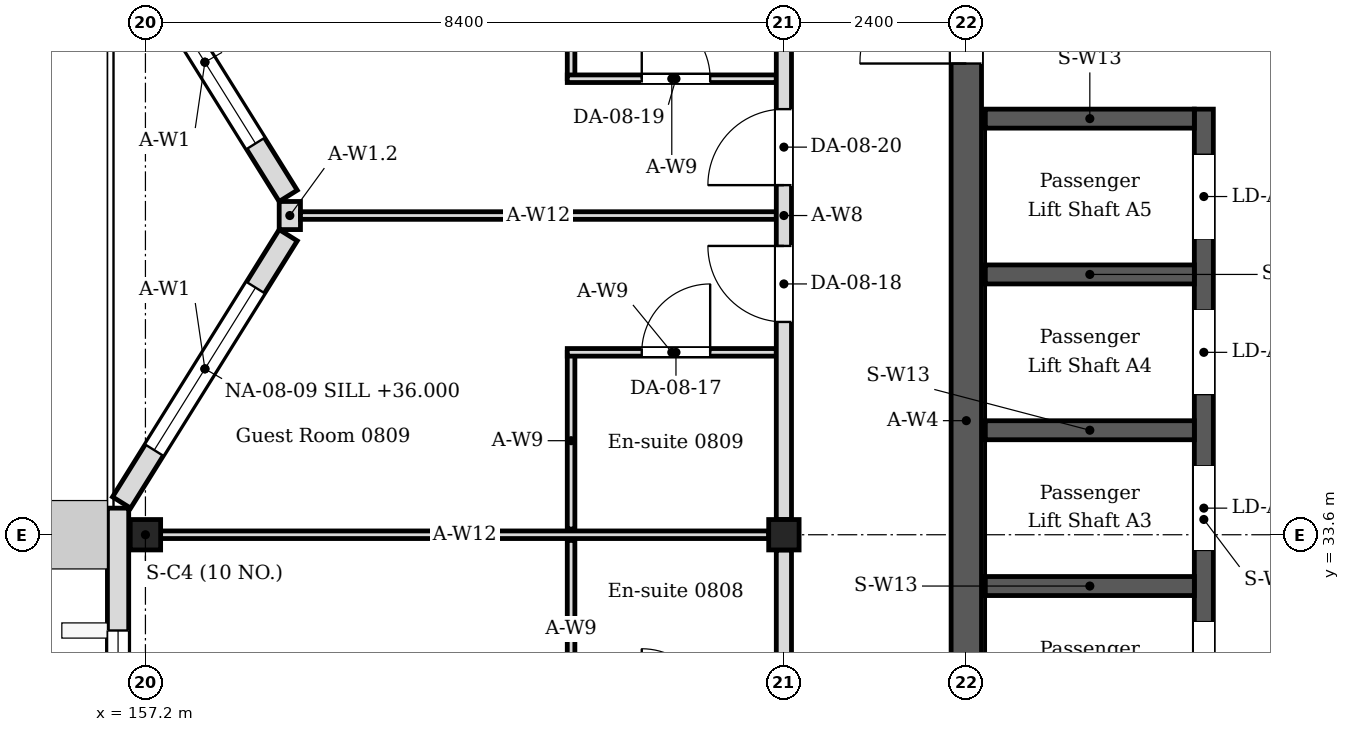
"""IFC4 building model, lengths in metres.
Left out: names, types, materials, properties, quantities, classifications, styles, units other than length and angle.
Written with IfcOpenShell. Run it as: python <this file> out.ifc"""

import sys

from ifc_helpers import new_model, si_unit, direction, frame, frame_2d, origin, origin_2d, place, context, subcontext, project, spatial, rectangle, i_section, extrude, element, fill, save


model = new_model("IFC4")
c1 = context("Model", 3, precision=1e-05, world=origin(), true_north=direction((0.0, 1.0)))
c2 = subcontext(c1, "Body", "Model", "MODEL_VIEW")
j1 = project(units=[si_unit("LENGTHUNIT", "METRE"), si_unit("PLANEANGLEUNIT", "RADIAN")], contexts=[c1])
p1 = place(None, origin())
s1 = spatial("IfcSite", under=j1, at=p1, CompositionType="ELEMENT")
p2 = place(p1, origin())
s2 = spatial("IfcBuilding", under=s1, at=p2, CompositionType="ELEMENT")
p3 = place(p2, frame((0.0, 0.0, 35.4)))
s3 = spatial("IfcBuildingStorey", under=s2, at=p3, CompositionType="ELEMENT", Elevation=35.4)
for number, where, z_axis, x_axis in (
    (1, (157.2, 33.6, 0.0), (0.0, 0.0, 1.0), (1.0, 0.0, 0.0)),
    (2, (165.6, 33.6, 0.0), (0.0, 0.0, 1.0), (1.0, 0.0, 0.0)),
):
    element("IfcColumn", number, at=place(p3, frame(where, z_axis=z_axis, x_axis=x_axis)), inside=s3, PredefinedType="COLUMN", context=c2, shape_type="SweptSolid", body=[
        extrude(i_section(OverallWidth=0.4, OverallDepth=0.4, WebThickness=0.013, FlangeThickness=0.021, FilletRadius=0.022, at=origin_2d()), origin(), (0.0, 0.0, 1.0), 4.2),
    ])
p4 = place(p3, frame((168.0, 25.4, 0.0), z_axis=(0.0, 0.0, 1.0), x_axis=(0.0, 1.0, 0.0)))
e3 = element("IfcWall", 3, at=p4, inside=s3, PredefinedType="SOLIDWALL", context=c2, shape_type="SweptSolid", body=[
    extrude(rectangle(XDim=16.4, YDim=0.4, at=frame_2d((8.2, 0.0))), origin(), (0.0, 0.0, 1.0), 4.05),
])
p5 = place(p4, frame((1.0, 0.0, 0.0)))
e4 = element("IfcOpeningElement", 4, at=p5, cuts=e3, PredefinedType="OPENING", context=c2, shape_type="SweptSolid", body=[
    extrude(rectangle(XDim=1.0, YDim=2.1, at=frame_2d((0.5, 1.05))), frame((0.0, 0.21, 0.0), z_axis=(0.0, -1.0, 0.0), x_axis=(1.0, 0.0, 0.0)), (0.0, 0.0, 1.0), 0.42),
])
p6 = place(p4, frame((14.4, 0.0, 0.0)))
e5 = element("IfcOpeningElement", 5, at=p6, cuts=e3, PredefinedType="OPENING", context=c2, shape_type="SweptSolid", body=[
    extrude(rectangle(XDim=1.4, YDim=2.1, at=frame_2d((0.7, 1.05))), frame((0.0, 0.21, 0.0), z_axis=(0.0, -1.0, 0.0), x_axis=(1.0, 0.0, 0.0)), (0.0, 0.0, 1.0), 0.42),
])
p7 = place(p3, frame((156.84, 24.85, 0.0), z_axis=(0.0, 0.0, 1.0), x_axis=(0.0, 1.0, 0.0)))
e6 = element("IfcWall", 6, at=p7, inside=s3, PredefinedType="SOLIDWALL", context=c2, shape_type="SweptSolid", body=[
    extrude(rectangle(XDim=9.1, YDim=0.28, at=frame_2d((4.55, 0.0))), origin(), (0.0, 0.0, 1.0), 4.05),
])
p8 = place(p7, frame((0.77, 0.0, 0.6)))
e7 = element("IfcOpeningElement", 7, at=p8, cuts=e6, PredefinedType="OPENING", context=c2, shape_type="SweptSolid", body=[
    extrude(rectangle(XDim=2.52, YDim=2.4, at=frame_2d((1.26, 1.2))), frame((0.0, 0.15, 0.0), z_axis=(0.0, -1.0, 0.0), x_axis=(1.0, 0.0, 0.0)), (0.0, 0.0, 1.0), 0.3),
])
p9 = place(p7, frame((4.97, 0.0, 0.6)))
e8 = element("IfcOpeningElement", 8, at=p9, cuts=e6, PredefinedType="OPENING", context=c2, shape_type="SweptSolid", body=[
    extrude(rectangle(XDim=2.52, YDim=2.4, at=frame_2d((1.26, 1.2))), frame((0.0, 0.15, 0.0), z_axis=(0.0, -1.0, 0.0), x_axis=(1.0, 0.0, 0.0)), (0.0, 0.0, 1.0), 0.3),
])
p10 = place(p3, frame((156.886, 34.024, 0.0), z_axis=(0.0, 0.0, 1.0), x_axis=(0.529018946142, 0.848610013271, 0.0)))
e9 = element("IfcWall", 9, at=p10, inside=s3, PredefinedType="SOLIDWALL", context=c2, shape_type="SweptSolid", body=[
    extrude(rectangle(XDim=4.144, YDim=0.28, at=frame_2d((2.072, 0.0))), origin(), (0.0, 0.0, 1.0), 4.05),
])
p11 = place(p10, frame((0.812, 0.0, 0.6)))
e10 = element("IfcOpeningElement", 10, at=p11, cuts=e9, PredefinedType="OPENING", context=c2, shape_type="SweptSolid", body=[
    extrude(rectangle(XDim=2.52, YDim=2.4, at=frame_2d((1.26, 1.2))), frame((0.0, 0.15, 0.0), z_axis=(0.0, -1.0, 0.0), x_axis=(1.0, 0.0, 0.0)), (0.0, 0.0, 1.0), 0.3),
])
p12 = place(p3, frame((159.079, 38.059, 0.0), z_axis=(0.0, 0.0, 1.0), x_axis=(-0.529018946142, 0.848610013271, 0.0)))
e11 = element("IfcWall", 11, at=p12, inside=s3, PredefinedType="SOLIDWALL", context=c2, shape_type="SweptSolid", body=[
    extrude(rectangle(XDim=4.144, YDim=0.28, at=frame_2d((2.072, 0.0))), origin(), (0.0, 0.0, 1.0), 4.05),
])
p13 = place(p12, frame((0.812, 0.0, 0.6)))
e12 = element("IfcOpeningElement", 12, at=p13, cuts=e11, PredefinedType="OPENING", context=c2, shape_type="SweptSolid", body=[
    extrude(rectangle(XDim=2.52, YDim=2.4, at=frame_2d((1.26, 1.2))), frame((0.0, 0.15, 0.0), z_axis=(0.0, -1.0, 0.0), x_axis=(1.0, 0.0, 0.0)), (0.0, 0.0, 1.0), 0.3),
])
p14 = place(p3, frame((159.1, 37.615, 0.0), z_axis=(0.0, 0.0, 1.0), x_axis=(0.0, 1.0, 0.0)))
e13 = element("IfcWall", 13, at=p14, inside=s3, PredefinedType="SOLIDWALL", context=c2, shape_type="SweptSolid", body=[
    extrude(rectangle(XDim=0.37, YDim=0.28, at=frame_2d((0.185, 0.0))), origin(), (0.0, 0.0, 1.0), 3.604),
])
for number, where, z_axis, x_axis in (
    (14, (162.8, 31.2, 0.0), (0.0, 0.0, 1.0), (0.0, 1.0, 0.0)),
    (15, (162.8, 33.675, 0.0), (0.0, 0.0, 1.0), (0.0, 1.0, 0.0)),
):
    element("IfcWall", number, at=place(p3, frame(where, z_axis=z_axis, x_axis=x_axis)), inside=s3, PredefinedType="PARTITIONING", context=c2, shape_type="SweptSolid", body=[
        extrude(rectangle(XDim=2.325, YDim=0.1, at=frame_2d((1.163, 0.0))), origin(), (0.0, 0.0, 1.0), 4.05),
    ])
p15 = place(p3, frame((162.75, 36.0, 0.0), z_axis=(0.0, 0.0, 1.0), x_axis=(1.0, 0.0, 0.0)))
e16 = element("IfcWall", 16, at=p15, inside=s3, PredefinedType="PARTITIONING", context=c2, shape_type="SweptSolid", body=[
    extrude(rectangle(XDim=2.75, YDim=0.1, at=frame_2d((1.375, 0.0))), origin(), (0.0, 0.0, 1.0), 4.05),
])
p16 = place(p15, frame((0.98, 0.0, 0.0)))
e17 = element("IfcOpeningElement", 17, at=p16, cuts=e16, PredefinedType="OPENING", context=c2, shape_type="SweptSolid", body=[
    extrude(rectangle(XDim=0.9, YDim=2.1, at=frame_2d((0.45, 1.05))), frame((0.0, 0.06, 0.0), z_axis=(0.0, -1.0, 0.0), x_axis=(1.0, 0.0, 0.0)), (0.0, 0.0, 1.0), 0.12),
])
p17 = place(p3, frame((162.8, 39.6, 0.0), z_axis=(0.0, 0.0, 1.0), x_axis=(0.0, 1.0, 0.0)))
e18 = element("IfcWall", 18, at=p17, inside=s3, PredefinedType="PARTITIONING", context=c2, shape_type="SweptSolid", body=[
    extrude(rectangle(XDim=2.325, YDim=0.1, at=frame_2d((1.163, 0.0))), origin(), (0.0, 0.0, 1.0), 4.05),
])
p18 = place(p3, frame((162.75, 39.6, 0.0), z_axis=(0.0, 0.0, 1.0), x_axis=(1.0, 0.0, 0.0)))
e19 = element("IfcWall", 19, at=p18, inside=s3, PredefinedType="PARTITIONING", context=c2, shape_type="SweptSolid", body=[
    extrude(rectangle(XDim=2.75, YDim=0.1, at=frame_2d((1.375, 0.0))), origin(), (0.0, 0.0, 1.0), 4.05),
])
p19 = place(p18, frame((0.98, 0.0, 0.0)))
e20 = element("IfcOpeningElement", 20, at=p19, cuts=e19, PredefinedType="OPENING", context=c2, shape_type="SweptSolid", body=[
    extrude(rectangle(XDim=0.9, YDim=2.1, at=frame_2d((0.45, 1.05))), frame((0.0, 0.06, 0.0), z_axis=(0.0, -1.0, 0.0), x_axis=(1.0, 0.0, 0.0)), (0.0, 0.0, 1.0), 0.12),
])
p20 = place(p3, frame((157.4, 33.6, 0.0), z_axis=(0.0, 0.0, 1.0), x_axis=(1.0, 0.0, 0.0)))
e21 = element("IfcWall", 21, at=p20, inside=s3, PredefinedType="PARTITIONING", context=c2, shape_type="SweptSolid", body=[
    extrude(rectangle(XDim=8.0, YDim=0.1, at=frame_2d((4.0, 0.0))), origin(), (0.0, 0.0, 1.0), 3.604),
])
p21 = place(p3, frame((159.24, 37.8, 0.0), z_axis=(0.0, 0.0, 1.0), x_axis=(1.0, 0.0, 0.0)))
e22 = element("IfcWall", 22, at=p21, inside=s3, PredefinedType="PARTITIONING", context=c2, shape_type="SweptSolid", body=[
    extrude(rectangle(XDim=6.26, YDim=0.1, at=frame_2d((3.13, 0.0))), origin(), (0.0, 0.0, 1.0), 3.604),
])
p22 = place(p3, frame((165.6, 25.4, 0.0), z_axis=(0.0, 0.0, 1.0), x_axis=(0.0, 1.0, 0.0)))
e23 = element("IfcWall", 23, at=p22, inside=s3, PredefinedType="PARTITIONING", context=c2, shape_type="SweptSolid", body=[
    extrude(rectangle(XDim=8.0, YDim=0.2, at=frame_2d((4.0, 0.0))), origin(), (0.0, 0.0, 1.0), 3.45),
])
p23 = place(p22, frame((1.98, 0.0, 0.0)))
e24 = element("IfcOpeningElement", 24, at=p23, cuts=e23, PredefinedType="OPENING", context=c2, shape_type="SweptSolid", body=[
    extrude(rectangle(XDim=1.0, YDim=2.4, at=frame_2d((0.5, 1.2))), frame((0.0, 0.11, 0.0), z_axis=(0.0, -1.0, 0.0), x_axis=(1.0, 0.0, 0.0)), (0.0, 0.0, 1.0), 0.22),
])
p24 = place(p22, frame((3.98, 0.0, 0.0)))
e25 = element("IfcOpeningElement", 25, at=p24, cuts=e23, PredefinedType="OPENING", context=c2, shape_type="SweptSolid", body=[
    extrude(rectangle(XDim=1.0, YDim=2.4, at=frame_2d((0.5, 1.2))), frame((0.0, 0.11, 0.0), z_axis=(0.0, -1.0, 0.0), x_axis=(1.0, 0.0, 0.0)), (0.0, 0.0, 1.0), 0.22),
])
p25 = place(p3, frame((165.6, 33.8, 0.0), z_axis=(0.0, 0.0, 1.0), x_axis=(0.0, 1.0, 0.0)))
e26 = element("IfcWall", 26, at=p25, inside=s3, PredefinedType="PARTITIONING", context=c2, shape_type="SweptSolid", body=[
    extrude(rectangle(XDim=8.0, YDim=0.2, at=frame_2d((4.0, 0.0))), origin(), (0.0, 0.0, 1.0), 3.45),
])
p26 = place(p25, frame((2.6, 0.0, 0.0)))
e27 = element("IfcOpeningElement", 27, at=p26, cuts=e26, PredefinedType="OPENING", context=c2, shape_type="SweptSolid", body=[
    extrude(rectangle(XDim=1.0, YDim=2.4, at=frame_2d((0.5, 1.2))), frame((0.0, 0.11, 0.0), z_axis=(0.0, -1.0, 0.0), x_axis=(1.0, 0.0, 0.0)), (0.0, 0.0, 1.0), 0.22),
])
p27 = place(p25, frame((4.4, 0.0, 0.0)))
e28 = element("IfcOpeningElement", 28, at=p27, cuts=e26, PredefinedType="OPENING", context=c2, shape_type="SweptSolid", body=[
    extrude(rectangle(XDim=1.0, YDim=2.4, at=frame_2d((0.5, 1.2))), frame((0.0, 0.11, 0.0), z_axis=(0.0, -1.0, 0.0), x_axis=(1.0, 0.0, 0.0)), (0.0, 0.0, 1.0), 0.22),
])
p28 = place(p3, frame((171.125, 28.3, 0.0), z_axis=(0.0, 0.0, 1.0), x_axis=(0.0, 1.0, 0.0)))
e29 = element("IfcWall", 29, at=p28, inside=s3, PredefinedType="SOLIDWALL", context=c2, shape_type="SweptSolid", body=[
    extrude(rectangle(XDim=10.9, YDim=0.25, at=frame_2d((5.45, 0.0))), origin(), (0.0, 0.0, 1.0), 4.05),
])
p29 = place(p28, frame((0.8, 0.0, 0.0)))
e30 = element("IfcOpeningElement", 30, at=p29, cuts=e29, PredefinedType="OPENING", context=c2, shape_type="SweptSolid", body=[
    extrude(rectangle(XDim=1.1, YDim=2.1, at=frame_2d((0.55, 1.05))), frame((0.0, 0.135, 0.0), z_axis=(0.0, -1.0, 0.0), x_axis=(1.0, 0.0, 0.0)), (0.0, 0.0, 1.0), 0.27),
])
p30 = place(p28, frame((3.05, 0.0, 0.0)))
e31 = element("IfcOpeningElement", 31, at=p30, cuts=e29, PredefinedType="OPENING", context=c2, shape_type="SweptSolid", body=[
    extrude(rectangle(XDim=1.1, YDim=2.1, at=frame_2d((0.55, 1.05))), frame((0.0, 0.135, 0.0), z_axis=(0.0, -1.0, 0.0), x_axis=(1.0, 0.0, 0.0)), (0.0, 0.0, 1.0), 0.27),
])
p31 = place(p28, frame((5.1, 0.0, 0.0)))
e32 = element("IfcOpeningElement", 32, at=p31, cuts=e29, PredefinedType="OPENING", context=c2, shape_type="SweptSolid", body=[
    extrude(rectangle(XDim=1.1, YDim=2.1, at=frame_2d((0.55, 1.05))), frame((0.0, 0.135, 0.0), z_axis=(0.0, -1.0, 0.0), x_axis=(1.0, 0.0, 0.0)), (0.0, 0.0, 1.0), 0.27),
])
p32 = place(p28, frame((7.15, 0.0, 0.0)))
e33 = element("IfcOpeningElement", 33, at=p32, cuts=e29, PredefinedType="OPENING", context=c2, shape_type="SweptSolid", body=[
    extrude(rectangle(XDim=1.1, YDim=2.1, at=frame_2d((0.55, 1.05))), frame((0.0, 0.135, 0.0), z_axis=(0.0, -1.0, 0.0), x_axis=(1.0, 0.0, 0.0)), (0.0, 0.0, 1.0), 0.27),
])
p33 = place(p28, frame((9.2, 0.0, 0.0)))
e34 = element("IfcOpeningElement", 34, at=p33, cuts=e29, PredefinedType="OPENING", context=c2, shape_type="SweptSolid", body=[
    extrude(rectangle(XDim=1.1, YDim=2.1, at=frame_2d((0.55, 1.05))), frame((0.0, 0.135, 0.0), z_axis=(0.0, -1.0, 0.0), x_axis=(1.0, 0.0, 0.0)), (0.0, 0.0, 1.0), 0.27),
])
for number, where, z_axis, x_axis in (
    (35, (168.25, 32.925, 0.0), (0.0, 0.0, 1.0), (1.0, 0.0, 0.0)),
    (36, (168.25, 34.975, 0.0), (0.0, 0.0, 1.0), (1.0, 0.0, 0.0)),
    (37, (168.25, 37.025, 0.0), (0.0, 0.0, 1.0), (1.0, 0.0, 0.0)),
    (38, (168.25, 39.075, 0.0), (0.0, 0.0, 1.0), (1.0, 0.0, 0.0)),
):
    element("IfcWall", number, at=place(p3, frame(where, z_axis=z_axis, x_axis=x_axis)), inside=s3, PredefinedType="SOLIDWALL", context=c2, shape_type="SweptSolid", body=[
        extrude(rectangle(XDim=2.75, YDim=0.25, at=frame_2d((1.375, 0.0))), origin(), (0.0, 0.0, 1.0), 4.05),
    ])
p34 = place(p9, origin())
e39 = element("IfcWindow", 39, at=p34, inside=s3, PartitioningType="SINGLE_PANEL", PredefinedType="WINDOW", context=c2, shape_type="SweptSolid", body=[
    extrude(rectangle(XDim=2.52, YDim=2.4, at=frame_2d((1.26, 1.2))), frame((0.0, 0.03, 0.0), z_axis=(0.0, -1.0, 0.0), x_axis=(1.0, 0.0, 0.0)), (0.0, 0.0, 1.0), 0.06),
])
fill(e8, e39)
p35 = place(p11, origin())
e40 = element("IfcWindow", 40, at=p35, inside=s3, PartitioningType="SINGLE_PANEL", PredefinedType="WINDOW", context=c2, shape_type="SweptSolid", body=[
    extrude(rectangle(XDim=2.52, YDim=2.4, at=frame_2d((1.26, 1.2))), frame((0.0, 0.03, 0.0), z_axis=(0.0, -1.0, 0.0), x_axis=(1.0, 0.0, 0.0)), (0.0, 0.0, 1.0), 0.06),
])
fill(e10, e40)
p36 = place(p13, origin())
e41 = element("IfcWindow", 41, at=p36, inside=s3, PartitioningType="SINGLE_PANEL", PredefinedType="WINDOW", context=c2, shape_type="SweptSolid", body=[
    extrude(rectangle(XDim=2.52, YDim=2.4, at=frame_2d((1.26, 1.2))), frame((0.0, 0.03, 0.0), z_axis=(0.0, -1.0, 0.0), x_axis=(1.0, 0.0, 0.0)), (0.0, 0.0, 1.0), 0.06),
])
fill(e12, e41)
p37 = place(p16, origin())
e42 = element("IfcDoor", 42, at=p37, inside=s3, OperationType="SINGLE_SWING_RIGHT", PredefinedType="DOOR", context=c2, shape_type="SweptSolid", body=[
    extrude(rectangle(XDim=0.9, YDim=2.1, at=frame_2d((0.45, 1.05))), frame((0.0, 0.025, 0.0), z_axis=(0.0, -1.0, 0.0), x_axis=(1.0, 0.0, 0.0)), (0.0, 0.0, 1.0), 0.05),
])
fill(e17, e42)
p38 = place(p26, origin())
e43 = element("IfcDoor", 43, at=p38, inside=s3, OperationType="SINGLE_SWING_RIGHT", PredefinedType="DOOR", context=c2, shape_type="SweptSolid", body=[
    extrude(rectangle(XDim=1.0, YDim=2.4, at=frame_2d((0.5, 1.2))), frame((0.0, 0.025, 0.0), z_axis=(0.0, -1.0, 0.0), x_axis=(1.0, 0.0, 0.0)), (0.0, 0.0, 1.0), 0.05),
])
fill(e27, e43)
p39 = place(p19, origin())
e44 = element("IfcDoor", 44, at=p39, inside=s3, OperationType="SINGLE_SWING_LEFT", PredefinedType="DOOR", context=c2, shape_type="SweptSolid", body=[
    extrude(rectangle(XDim=0.9, YDim=2.1, at=frame_2d((0.45, 1.05))), frame((0.0, 0.025, 0.0), z_axis=(0.0, -1.0, 0.0), x_axis=(1.0, 0.0, 0.0)), (0.0, 0.0, 1.0), 0.05),
])
fill(e20, e44)
p40 = place(p27, origin())
e45 = element("IfcDoor", 45, at=p40, inside=s3, OperationType="SINGLE_SWING_LEFT", PredefinedType="DOOR", context=c2, shape_type="SweptSolid", body=[
    extrude(rectangle(XDim=1.0, YDim=2.4, at=frame_2d((0.5, 1.2))), frame((0.0, 0.025, 0.0), z_axis=(0.0, -1.0, 0.0), x_axis=(1.0, 0.0, 0.0)), (0.0, 0.0, 1.0), 0.05),
])
fill(e28, e45)
p41 = place(p30, origin())
e46 = element("IfcDoor", 46, at=p41, inside=s3, OperationType="SLIDING_TO_LEFT", PredefinedType="DOOR", context=c2, shape_type="SweptSolid", body=[
    extrude(rectangle(XDim=1.1, YDim=2.1, at=frame_2d((0.55, 1.05))), frame((0.0, 0.025, 0.0), z_axis=(0.0, -1.0, 0.0), x_axis=(1.0, 0.0, 0.0)), (0.0, 0.0, 1.0), 0.05),
])
fill(e31, e46)
p42 = place(p31, origin())
e47 = element("IfcDoor", 47, at=p42, inside=s3, OperationType="SLIDING_TO_LEFT", PredefinedType="DOOR", context=c2, shape_type="SweptSolid", body=[
    extrude(rectangle(XDim=1.1, YDim=2.1, at=frame_2d((0.55, 1.05))), frame((0.0, 0.025, 0.0), z_axis=(0.0, -1.0, 0.0), x_axis=(1.0, 0.0, 0.0)), (0.0, 0.0, 1.0), 0.05),
])
fill(e32, e47)
p43 = place(p32, origin())
e48 = element("IfcDoor", 48, at=p43, inside=s3, OperationType="SLIDING_TO_LEFT", PredefinedType="DOOR", context=c2, shape_type="SweptSolid", body=[
    extrude(rectangle(XDim=1.1, YDim=2.1, at=frame_2d((0.55, 1.05))), frame((0.0, 0.025, 0.0), z_axis=(0.0, -1.0, 0.0), x_axis=(1.0, 0.0, 0.0)), (0.0, 0.0, 1.0), 0.05),
])
fill(e33, e48)
p44 = place(p33, origin())
e49 = element("IfcDoor", 49, at=p44, inside=s3, OperationType="SLIDING_TO_LEFT", PredefinedType="DOOR", context=c2, shape_type="SweptSolid", body=[
    extrude(rectangle(XDim=1.1, YDim=2.1, at=frame_2d((0.55, 1.05))), frame((0.0, 0.025, 0.0), z_axis=(0.0, -1.0, 0.0), x_axis=(1.0, 0.0, 0.0)), (0.0, 0.0, 1.0), 0.05),
])
fill(e34, e49)
p45 = place(p6, origin())
e50 = element("IfcDoor", 50, at=p45, inside=s3, OperationType="DOUBLE_DOOR_DOUBLE_SWING", PredefinedType="DOOR", context=c2, shape_type="SweptSolid", body=[
    extrude(rectangle(XDim=1.4, YDim=2.1, at=frame_2d((0.7, 1.05))), frame((0.0, 0.025, 0.0), z_axis=(0.0, -1.0, 0.0), x_axis=(1.0, 0.0, 0.0)), (0.0, 0.0, 1.0), 0.05),
])
fill(e5, e50)
save(model, sys.argv[1])
